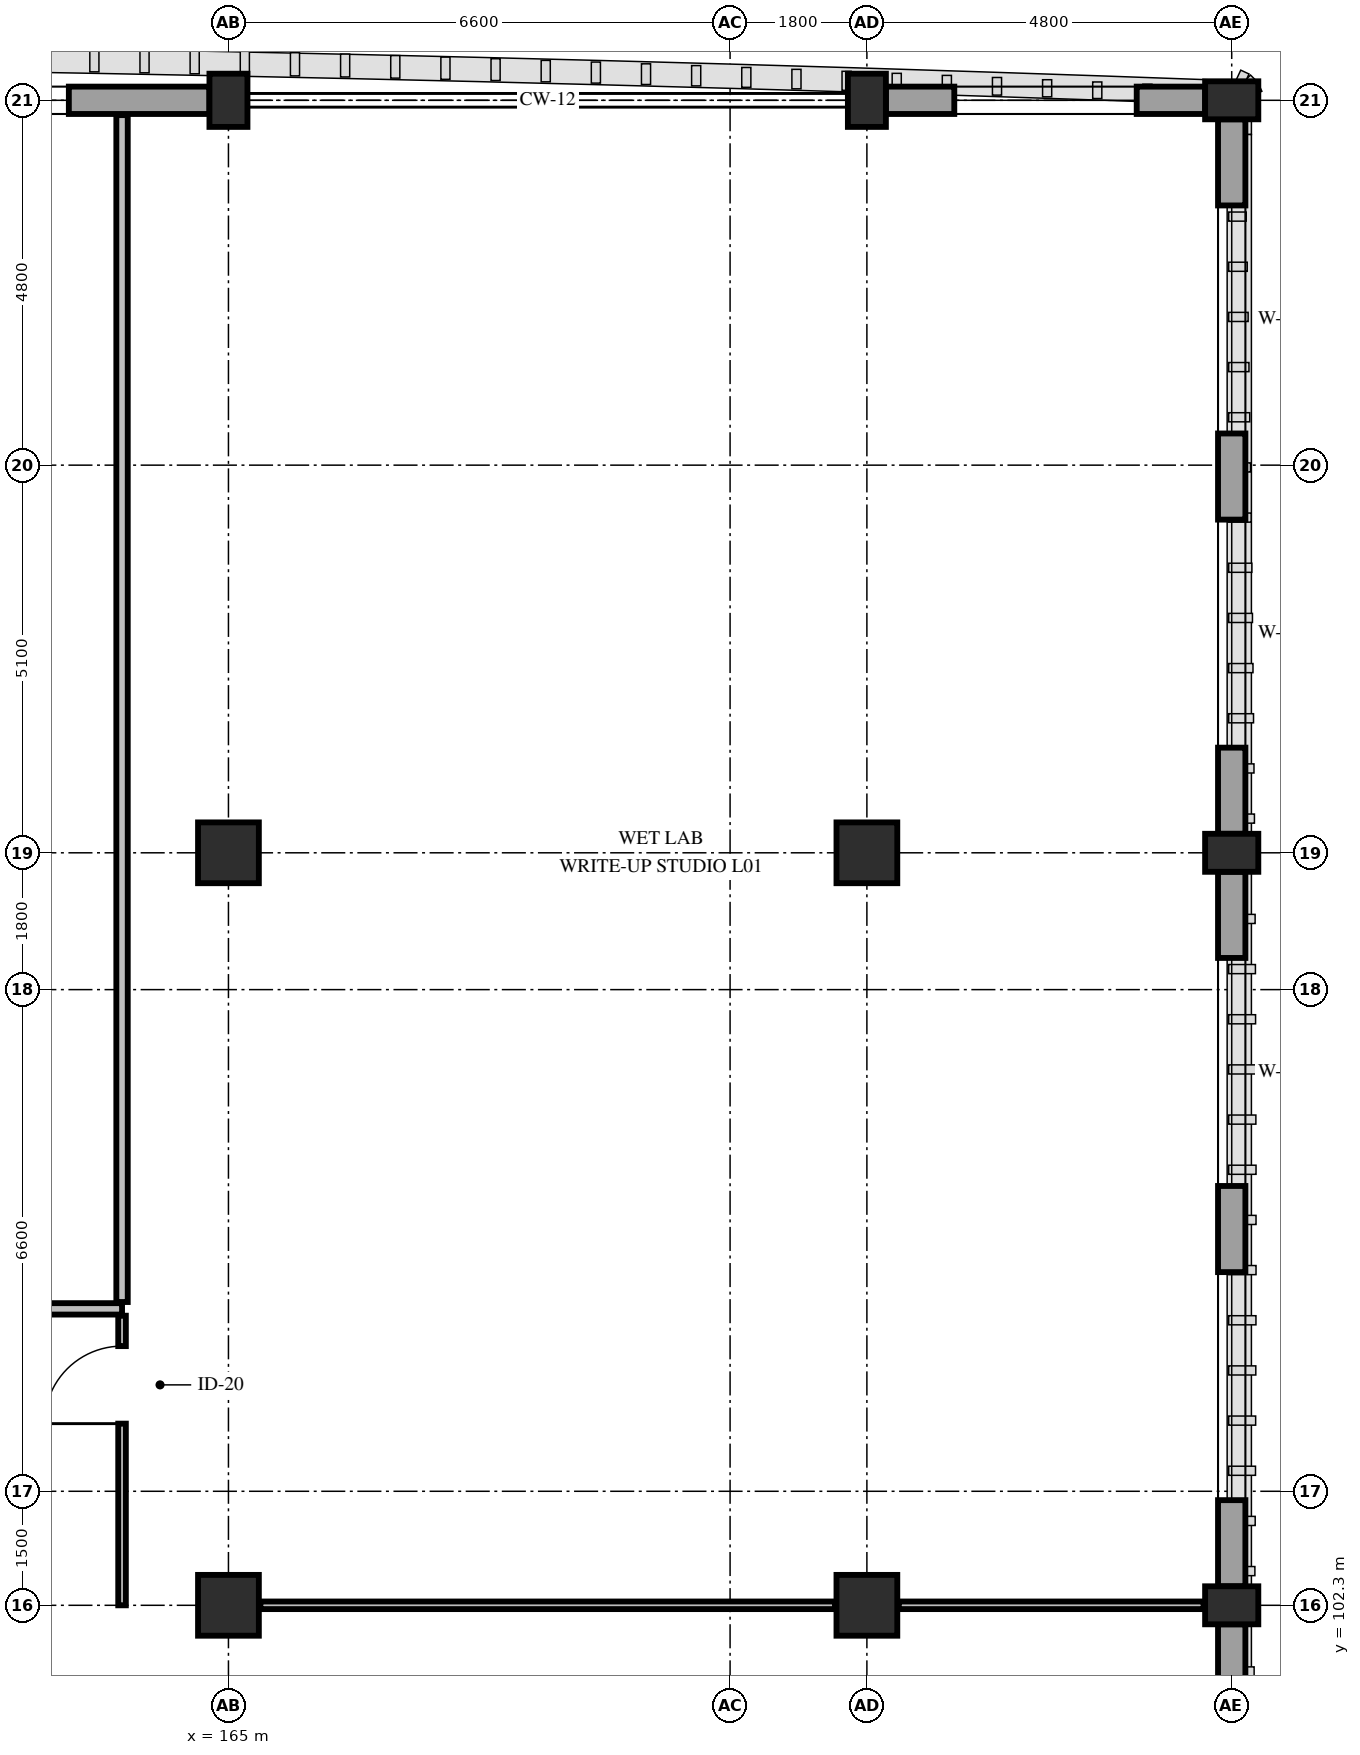
"""IFC4 building model, lengths in metres.
Left out: names, types, materials, properties, quantities, classifications, styles, units other than length and angle.
Written with IfcOpenShell. Run it as: python <this file> out.ifc"""

import sys

from ifc_helpers import new_model, si_unit, direction, frame, frame_2d, origin, origin_2d, place, context, subcontext, project, spatial, rectangle, extrude, element, fill, save


model = new_model("IFC4")
c1 = context("Model", 3, precision=1e-05, world=origin(), true_north=direction((0.0, 1.0)))
c2 = subcontext(c1, "Body", "Model", "MODEL_VIEW")
j1 = project(units=[si_unit("LENGTHUNIT", "METRE"), si_unit("PLANEANGLEUNIT", "RADIAN")], contexts=[c1])
p1 = place(None, origin())
s1 = spatial("IfcSite", under=j1, at=p1, CompositionType="ELEMENT")
p2 = place(p1, origin())
s2 = spatial("IfcBuilding", under=s1, at=p2, CompositionType="ELEMENT")
p3 = place(p2, frame((0.0, 0.0, 5.4)))
s3 = spatial("IfcBuildingStorey", under=s2, at=p3, CompositionType="ELEMENT", Elevation=5.4)
for number, where, z_axis, x_axis in (
    (1, (165.0, 102.3, 0.0), (0.0, 0.0, 1.0), (1.0, 0.0, 0.0)),
    (2, (165.0, 112.2, 0.0), (0.0, 0.0, 1.0), (1.0, 0.0, 0.0)),
):
    element("IfcColumn", number, at=place(p3, frame(where, z_axis=z_axis, x_axis=x_axis)), inside=s3, PredefinedType="COLUMN", context=c2, shape_type="SweptSolid", body=[
        extrude(rectangle(XDim=0.8, YDim=0.8, at=origin_2d()), origin(), (0.0, 0.0, 1.0), 4.8),
    ])
p4 = place(p3, frame((165.0, 122.1, 0.0), z_axis=(0.0, 0.0, 1.0), x_axis=(1.0, 0.0, 0.0)))
e3 = element("IfcColumn", 3, at=p4, inside=s3, PredefinedType="PILASTER", context=c2, shape_type="SweptSolid", body=[
    extrude(rectangle(XDim=0.5, YDim=0.7, at=origin_2d()), origin(), (0.0, 0.0, 1.0), 4.8),
])
for number, where, z_axis, x_axis in (
    (4, (173.4, 102.3, 0.0), (0.0, 0.0, 1.0), (1.0, 0.0, 0.0)),
    (5, (173.4, 112.2, 0.0), (0.0, 0.0, 1.0), (1.0, 0.0, 0.0)),
):
    element("IfcColumn", number, at=place(p3, frame(where, z_axis=z_axis, x_axis=x_axis)), inside=s3, PredefinedType="COLUMN", context=c2, shape_type="SweptSolid", body=[
        extrude(rectangle(XDim=0.8, YDim=0.8, at=origin_2d()), origin(), (0.0, 0.0, 1.0), 4.8),
    ])
for number, where, z_axis, x_axis in (
    (6, (173.4, 122.1, 0.0), (0.0, 0.0, 1.0), (1.0, 0.0, 0.0)),
    (7, (178.2, 102.3, 0.0), (0.0, 0.0, 1.0), (0.0, 1.0, 0.0)),
    (8, (178.2, 112.2, 0.0), (0.0, 0.0, 1.0), (0.0, 1.0, 0.0)),
    (9, (178.2, 122.1, 0.0), (0.0, 0.0, 1.0), (0.0, 1.0, 0.0)),
):
    element("IfcColumn", number, at=place(p3, frame(where, z_axis=z_axis, x_axis=x_axis)), inside=s3, PredefinedType="PILASTER", context=c2, shape_type="SweptSolid", body=[
        extrude(rectangle(XDim=0.5, YDim=0.7, at=origin_2d()), origin(), (0.0, 0.0, 1.0), 4.8),
    ])
p5 = place(p3, frame((158.65, 122.1, 0.0), z_axis=(0.0, 0.0, 1.0), x_axis=(1.0, 0.0, 0.0)))
e10 = element("IfcWall", 10, at=p5, inside=s3, PredefinedType="STANDARD", context=c2, shape_type="SweptSolid", body=[
    extrude(rectangle(XDim=6.1, YDim=0.36, at=frame_2d((3.05, 0.0))), origin(), (0.0, 0.0, 1.0), 3.78),
])
p6 = place(p5, frame((1.85, 0.0, 0.85)))
e11 = element("IfcOpeningElement", 11, at=p6, cuts=e10, PredefinedType="OPENING", context=c2, shape_type="SweptSolid", body=[
    extrude(rectangle(XDim=2.4, YDim=1.88, at=frame_2d((1.2, 0.94))), frame((0.0, 0.195, 0.0), z_axis=(0.0, -1.0, 0.0), x_axis=(1.0, 0.0, 0.0)), (0.0, 0.0, 1.0), 0.39),
])
p7 = place(p3, frame((173.65, 122.1, 0.0), z_axis=(0.0, 0.0, 1.0), x_axis=(1.0, 0.0, 0.0)))
e12 = element("IfcWall", 12, at=p7, inside=s3, PredefinedType="STANDARD", context=c2, shape_type="SweptSolid", body=[
    extrude(rectangle(XDim=4.2, YDim=0.36, at=frame_2d((2.1, 0.0))), origin(), (0.0, 0.0, 1.0), 3.78),
])
p8 = place(p7, frame((0.9, 0.0, 0.85)))
e13 = element("IfcOpeningElement", 13, at=p8, cuts=e12, PredefinedType="OPENING", context=c2, shape_type="SweptSolid", body=[
    extrude(rectangle(XDim=2.4, YDim=1.88, at=frame_2d((1.2, 0.94))), frame((0.0, 0.195, 0.0), z_axis=(0.0, -1.0, 0.0), x_axis=(1.0, 0.0, 0.0)), (0.0, 0.0, 1.0), 0.39),
])
p9 = place(p3, frame((178.2, 121.85, 0.0), z_axis=(0.0, 0.0, 1.0), x_axis=(0.0, -1.0, 0.0)))
e14 = element("IfcWall", 14, at=p9, inside=s3, PredefinedType="STANDARD", context=c2, shape_type="SweptSolid", body=[
    extrude(rectangle(XDim=9.4, YDim=0.36, at=frame_2d((4.7, 0.0))), origin(), (0.0, 0.0, 1.0), 3.95),
])
p10 = place(p9, frame((1.133, 0.0, 0.85)))
e15 = element("IfcOpeningElement", 15, at=p10, cuts=e14, PredefinedType="OPENING", context=c2, shape_type="SweptSolid", body=[
    extrude(rectangle(XDim=3.0, YDim=1.88, at=frame_2d((1.5, 0.94))), frame((0.0, 0.195, 0.0), z_axis=(0.0, -1.0, 0.0), x_axis=(1.0, 0.0, 0.0)), (0.0, 0.0, 1.0), 0.39),
])
p11 = place(p9, frame((5.267, 0.0, 0.85)))
e16 = element("IfcOpeningElement", 16, at=p11, cuts=e14, PredefinedType="OPENING", context=c2, shape_type="SweptSolid", body=[
    extrude(rectangle(XDim=3.0, YDim=1.88, at=frame_2d((1.5, 0.94))), frame((0.0, 0.195, 0.0), z_axis=(0.0, -1.0, 0.0), x_axis=(1.0, 0.0, 0.0)), (0.0, 0.0, 1.0), 0.39),
])
p12 = place(p3, frame((178.2, 111.95, 0.0), z_axis=(0.0, 0.0, 1.0), x_axis=(0.0, -1.0, 0.0)))
e17 = element("IfcWall", 17, at=p12, inside=s3, PredefinedType="STANDARD", context=c2, shape_type="SweptSolid", body=[
    extrude(rectangle(XDim=9.4, YDim=0.36, at=frame_2d((4.7, 0.0))), origin(), (0.0, 0.0, 1.0), 3.95),
])
p13 = place(p12, frame((1.133, 0.0, 0.85)))
e18 = element("IfcOpeningElement", 18, at=p13, cuts=e17, PredefinedType="OPENING", context=c2, shape_type="SweptSolid", body=[
    extrude(rectangle(XDim=3.0, YDim=1.88, at=frame_2d((1.5, 0.94))), frame((0.0, 0.195, 0.0), z_axis=(0.0, -1.0, 0.0), x_axis=(1.0, 0.0, 0.0)), (0.0, 0.0, 1.0), 0.39),
])
p14 = place(p12, frame((5.267, 0.0, 0.85)))
e19 = element("IfcOpeningElement", 19, at=p14, cuts=e17, PredefinedType="OPENING", context=c2, shape_type="SweptSolid", body=[
    extrude(rectangle(XDim=3.0, YDim=1.88, at=frame_2d((1.5, 0.94))), frame((0.0, 0.195, 0.0), z_axis=(0.0, -1.0, 0.0), x_axis=(1.0, 0.0, 0.0)), (0.0, 0.0, 1.0), 0.39),
])
p15 = place(p3, frame((178.2, 102.05, 0.0), z_axis=(0.0, 0.0, 1.0), x_axis=(0.0, -1.0, 0.0)))
e20 = element("IfcWall", 20, at=p15, inside=s3, PredefinedType="STANDARD", context=c2, shape_type="SweptSolid", body=[
    extrude(rectangle(XDim=9.4, YDim=0.36, at=frame_2d((4.7, 0.0))), origin(), (0.0, 0.0, 1.0), 3.95),
])
p16 = place(p15, frame((1.133, 0.0, 0.85)))
e21 = element("IfcOpeningElement", 21, at=p16, cuts=e20, PredefinedType="OPENING", context=c2, shape_type="SweptSolid", body=[
    extrude(rectangle(XDim=3.0, YDim=1.88, at=frame_2d((1.5, 0.94))), frame((0.0, 0.195, 0.0), z_axis=(0.0, -1.0, 0.0), x_axis=(1.0, 0.0, 0.0)), (0.0, 0.0, 1.0), 0.39),
])
p17 = place(p15, frame((5.267, 0.0, 0.85)))
e22 = element("IfcOpeningElement", 22, at=p17, cuts=e20, PredefinedType="OPENING", context=c2, shape_type="SweptSolid", body=[
    extrude(rectangle(XDim=3.0, YDim=1.88, at=frame_2d((1.5, 0.94))), frame((0.0, 0.195, 0.0), z_axis=(0.0, -1.0, 0.0), x_axis=(1.0, 0.0, 0.0)), (0.0, 0.0, 1.0), 0.39),
])
p18 = place(p3, frame((151.09, 106.2, 0.0), z_axis=(0.0, 0.0, 1.0), x_axis=(1.0, 0.0, 0.0)))
e23 = element("IfcWall", 23, at=p18, inside=s3, PredefinedType="PARTITIONING", context=c2, shape_type="SweptSolid", body=[
    extrude(rectangle(XDim=12.51, YDim=0.15, at=frame_2d((6.255, 0.0))), origin(), (0.0, 0.0, 1.0), 3.78),
])
p19 = place(p18, frame((8.05, 0.0, 0.0)))
e24 = element("IfcOpeningElement", 24, at=p19, cuts=e23, PredefinedType="OPENING", context=c2, shape_type="SweptSolid", body=[
    extrude(rectangle(XDim=1.62, YDim=2.3, at=frame_2d((0.81, 1.15))), frame((0.0, 0.09, 0.0), z_axis=(0.0, -1.0, 0.0), x_axis=(1.0, 0.0, 0.0)), (0.0, 0.0, 1.0), 0.18),
])
p20 = place(p3, frame((163.6, 106.29, 0.0), z_axis=(0.0, 0.0, 1.0), x_axis=(0.0, 1.0, 0.0)))
e25 = element("IfcWall", 25, at=p20, inside=s3, PredefinedType="PARTITIONING", context=c2, shape_type="SweptSolid", body=[
    extrude(rectangle(XDim=15.615, YDim=0.15, at=frame_2d((7.808, 0.0))), origin(), (0.0, 0.0, 1.0), 3.93),
])
p21 = place(p3, frame((165.42, 102.3, 0.0), z_axis=(0.0, 0.0, 1.0), x_axis=(1.0, 0.0, 0.0)))
e26 = element("IfcWall", 26, at=p21, inside=s3, PredefinedType="PARTITIONING", context=c2, shape_type="SweptSolid", body=[
    extrude(rectangle(XDim=7.56, YDim=0.1, at=frame_2d((3.78, 0.0))), origin(), (0.0, 0.0, 1.0), 3.83),
])
p22 = place(p3, frame((173.82, 102.3, 0.0), z_axis=(0.0, 0.0, 1.0), x_axis=(1.0, 0.0, 0.0)))
e27 = element("IfcWall", 27, at=p22, inside=s3, PredefinedType="PARTITIONING", context=c2, shape_type="SweptSolid", body=[
    extrude(rectangle(XDim=4.01, YDim=0.1, at=frame_2d((2.005, 0.0))), origin(), (0.0, 0.0, 1.0), 4.065),
])
p23 = place(p3, frame((163.6, 102.3, 0.0), z_axis=(0.0, 0.0, 1.0), x_axis=(0.0, 1.0, 0.0)))
e28 = element("IfcWall", 28, at=p23, inside=s3, PredefinedType="PARTITIONING", context=c2, shape_type="SweptSolid", body=[
    extrude(rectangle(XDim=3.81, YDim=0.1, at=frame_2d((1.905, 0.0))), origin(), (0.0, 0.0, 1.0), 4.065),
])
p24 = place(p23, frame((2.39, 0.0, 0.0)))
e29 = element("IfcOpeningElement", 29, at=p24, cuts=e28, PredefinedType="OPENING", context=c2, shape_type="SweptSolid", body=[
    extrude(rectangle(XDim=1.02, YDim=2.2, at=frame_2d((0.51, 1.1))), frame((0.0, 0.065, 0.0), z_axis=(0.0, -1.0, 0.0), x_axis=(1.0, 0.0, 0.0)), (0.0, 0.0, 1.0), 0.13),
])
p25 = place(p6, origin())
e30 = element("IfcWindow", 30, at=p25, inside=s3, PartitioningType="DOUBLE_PANEL_VERTICAL", PredefinedType="WINDOW", context=c2, shape_type="SweptSolid", body=[
    extrude(rectangle(XDim=2.4, YDim=1.88, at=frame_2d((1.2, 0.94))), frame((0.0, 0.03, 0.0), z_axis=(0.0, -1.0, 0.0), x_axis=(1.0, 0.0, 0.0)), (0.0, 0.0, 1.0), 0.06),
])
fill(e11, e30)
p26 = place(p8, origin())
e31 = element("IfcWindow", 31, at=p26, inside=s3, PartitioningType="DOUBLE_PANEL_VERTICAL", PredefinedType="WINDOW", context=c2, shape_type="SweptSolid", body=[
    extrude(rectangle(XDim=2.4, YDim=1.88, at=frame_2d((1.2, 0.94))), frame((0.0, 0.03, 0.0), z_axis=(0.0, -1.0, 0.0), x_axis=(1.0, 0.0, 0.0)), (0.0, 0.0, 1.0), 0.06),
])
fill(e13, e31)
p27 = place(p10, origin())
e32 = element("IfcWindow", 32, at=p27, inside=s3, PartitioningType="DOUBLE_PANEL_VERTICAL", PredefinedType="WINDOW", context=c2, shape_type="SweptSolid", body=[
    extrude(rectangle(XDim=3.0, YDim=1.88, at=frame_2d((1.5, 0.94))), frame((0.0, 0.03, 0.0), z_axis=(0.0, -1.0, 0.0), x_axis=(1.0, 0.0, 0.0)), (0.0, 0.0, 1.0), 0.06),
])
fill(e15, e32)
p28 = place(p11, origin())
e33 = element("IfcWindow", 33, at=p28, inside=s3, PartitioningType="DOUBLE_PANEL_VERTICAL", PredefinedType="WINDOW", context=c2, shape_type="SweptSolid", body=[
    extrude(rectangle(XDim=3.0, YDim=1.88, at=frame_2d((1.5, 0.94))), frame((0.0, 0.03, 0.0), z_axis=(0.0, -1.0, 0.0), x_axis=(1.0, 0.0, 0.0)), (0.0, 0.0, 1.0), 0.06),
])
fill(e16, e33)
p29 = place(p13, origin())
e34 = element("IfcWindow", 34, at=p29, inside=s3, PartitioningType="DOUBLE_PANEL_VERTICAL", PredefinedType="WINDOW", context=c2, shape_type="SweptSolid", body=[
    extrude(rectangle(XDim=3.0, YDim=1.88, at=frame_2d((1.5, 0.94))), frame((0.0, 0.03, 0.0), z_axis=(0.0, -1.0, 0.0), x_axis=(1.0, 0.0, 0.0)), (0.0, 0.0, 1.0), 0.06),
])
fill(e18, e34)
p30 = place(p14, origin())
e35 = element("IfcWindow", 35, at=p30, inside=s3, PartitioningType="DOUBLE_PANEL_VERTICAL", PredefinedType="WINDOW", context=c2, shape_type="SweptSolid", body=[
    extrude(rectangle(XDim=3.0, YDim=1.88, at=frame_2d((1.5, 0.94))), frame((0.0, 0.03, 0.0), z_axis=(0.0, -1.0, 0.0), x_axis=(1.0, 0.0, 0.0)), (0.0, 0.0, 1.0), 0.06),
])
fill(e19, e35)
p31 = place(p24, origin())
e36 = element("IfcDoor", 36, at=p31, inside=s3, OperationType="SINGLE_SWING_LEFT", PredefinedType="DOOR", context=c2, shape_type="SweptSolid", body=[
    extrude(rectangle(XDim=1.02, YDim=2.2, at=frame_2d((0.51, 1.1))), frame((0.0, 0.025, 0.0), z_axis=(0.0, -1.0, 0.0), x_axis=(1.0, 0.0, 0.0)), (0.0, 0.0, 1.0), 0.05),
])
fill(e29, e36)
save(model, sys.argv[1])
